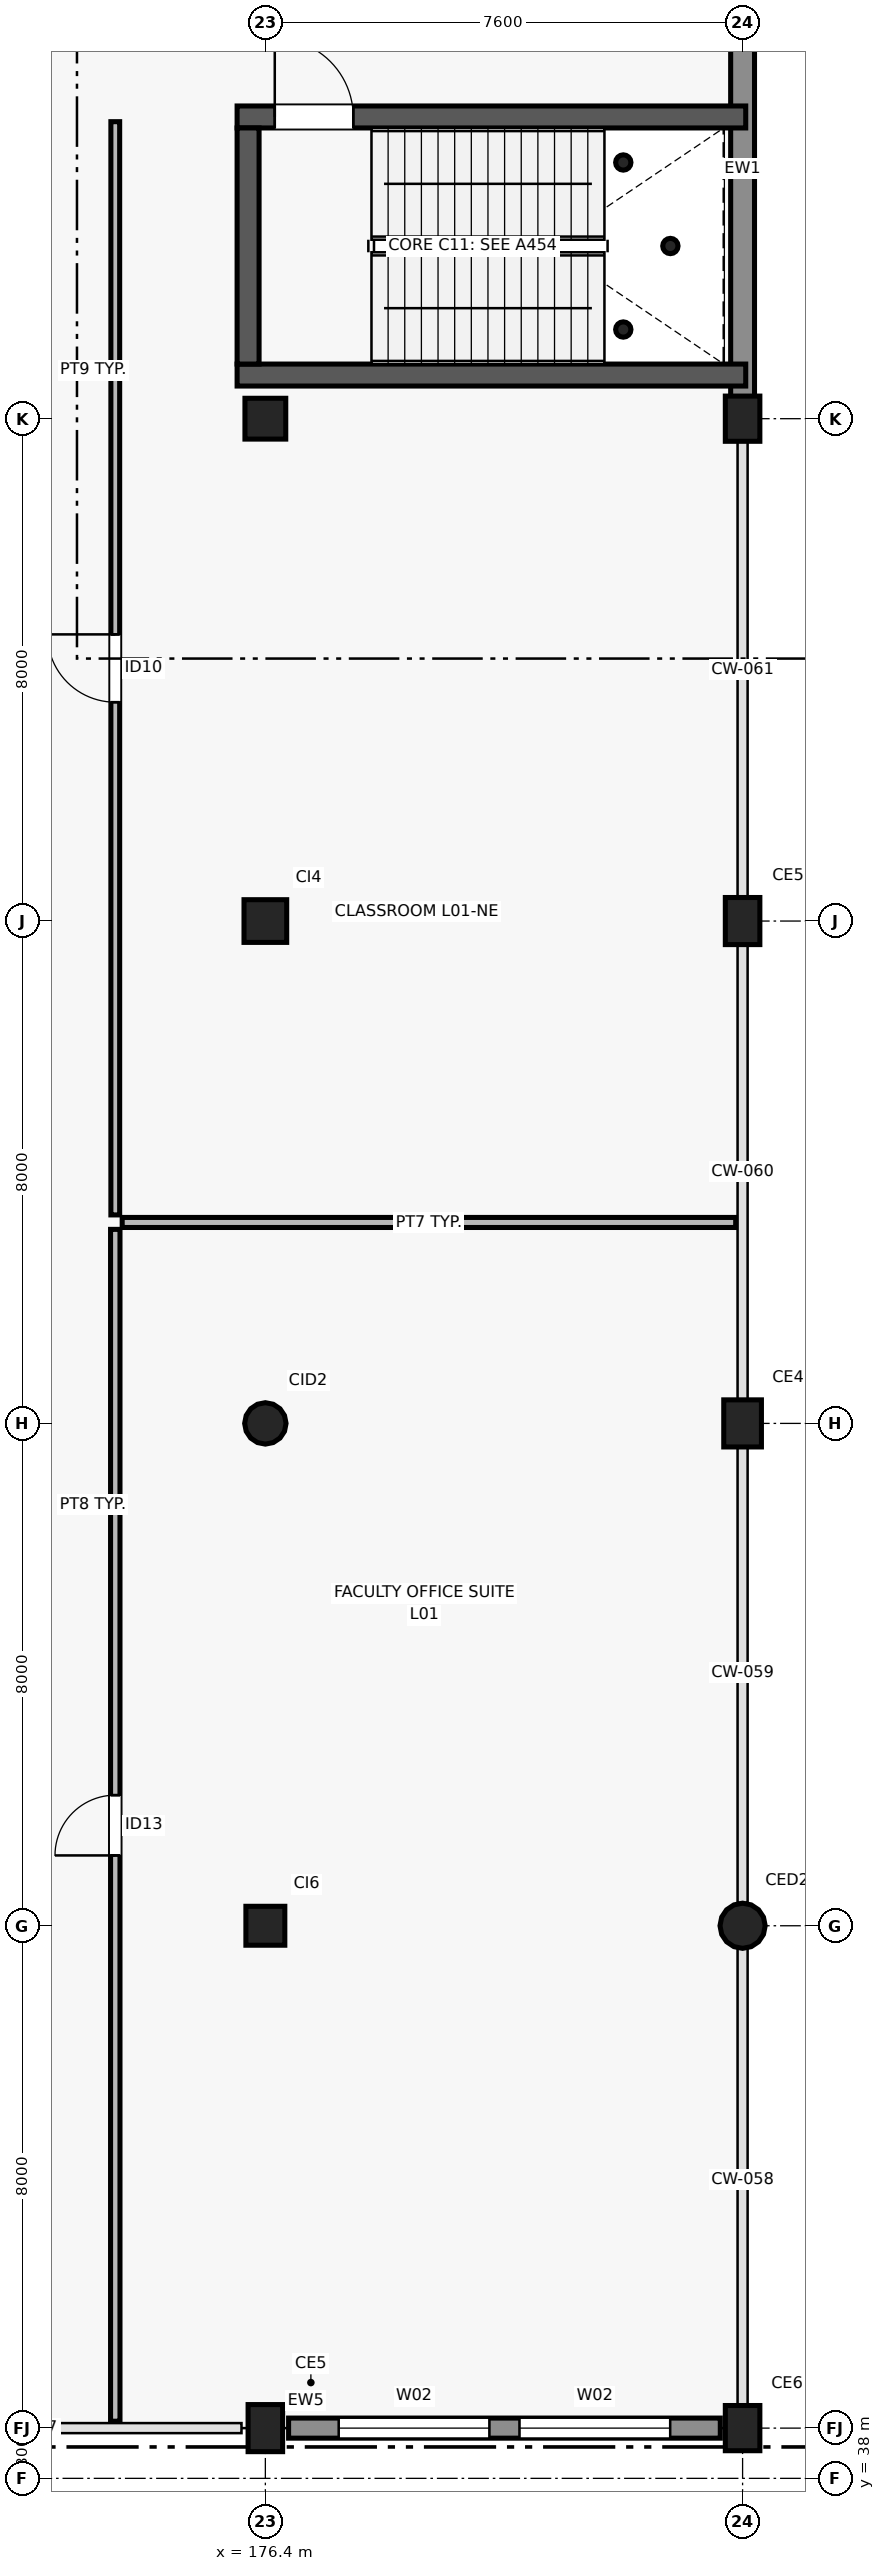
"""IFC4 building model, lengths in metres.
Left out: names, types, materials, properties, quantities, classifications, styles, units other than length and angle.
Written with IfcOpenShell. Run it as: python <this file> out.ifc"""

import sys

from ifc_helpers import new_model, si_unit, direction, frame, frame_2d, origin, origin_2d, place, context, subcontext, project, spatial, rectangle, circle, hollow_circle, extrude, element, fill, save


model = new_model("IFC4")
c1 = context("Model", 3, precision=1e-05, world=origin(), true_north=direction((0.0, 1.0)))
c2 = subcontext(c1, "Body", "Model", "MODEL_VIEW")
j1 = project(units=[si_unit("LENGTHUNIT", "METRE"), si_unit("PLANEANGLEUNIT", "RADIAN")], contexts=[c1])
p1 = place(None, origin())
s1 = spatial("IfcSite", under=j1, at=p1, CompositionType="ELEMENT")
p2 = place(p1, origin())
s2 = spatial("IfcBuilding", under=s1, at=p2, CompositionType="ELEMENT")
p3 = place(p2, frame((0.0, 0.0, 4.5)))
s3 = spatial("IfcBuildingStorey", under=s2, at=p3, CompositionType="ELEMENT", Elevation=4.5)
p4 = place(p3, frame((176.4, 38.8, 0.0), z_axis=(0.0, 0.0, 1.0), x_axis=(1.0, 0.0, 0.0)))
e1 = element("IfcColumn", 1, at=p4, inside=s3, PredefinedType="COLUMN", context=c2, shape_type="SweptSolid", body=[
    extrude(rectangle(XDim=0.75, YDim=0.55, at=origin_2d()), origin(), (0.0, 0.0, 1.0), 4.5),
])
p5 = place(p3, frame((176.4, 46.8, 0.0), z_axis=(0.0, 0.0, 1.0), x_axis=(1.0, 0.0, 0.0)))
e2 = element("IfcColumn", 2, at=p5, inside=s3, PredefinedType="COLUMN", context=c2, shape_type="SweptSolid", body=[
    extrude(rectangle(XDim=0.62, YDim=0.62, at=origin_2d()), origin(), (0.0, 0.0, 1.0), 4.5),
])
p6 = place(p3, frame((176.4, 54.8, 0.0), z_axis=(0.0, 0.0, 1.0), x_axis=(1.0, 0.0, 0.0)))
e3 = element("IfcColumn", 3, at=p6, inside=s3, PredefinedType="COLUMN", context=c2, shape_type="SweptSolid", body=[
    extrude(circle(Radius=0.33, at=origin_2d()), origin(), (0.0, 0.0, 1.0), 4.5),
])
p7 = place(p3, frame((176.4, 62.8, 0.0), z_axis=(0.0, 0.0, 1.0), x_axis=(1.0, 0.0, 0.0)))
e4 = element("IfcColumn", 4, at=p7, inside=s3, PredefinedType="COLUMN", context=c2, shape_type="SweptSolid", body=[
    extrude(rectangle(XDim=0.68, YDim=0.68, at=origin_2d()), origin(), (0.0, 0.0, 1.0), 4.5),
])
p8 = place(p3, frame((176.4, 70.8, 0.0), z_axis=(0.0, 0.0, 1.0), x_axis=(1.0, 0.0, 0.0)))
e5 = element("IfcColumn", 5, at=p8, inside=s3, PredefinedType="COLUMN", context=c2, shape_type="SweptSolid", body=[
    extrude(rectangle(XDim=0.65, YDim=0.65, at=origin_2d()), origin(), (0.0, 0.0, 1.0), 4.5),
])
p9 = place(p3, frame((184.0, 38.8, 0.0), z_axis=(0.0, 0.0, 1.0), x_axis=(1.0, 0.0, 0.0)))
e6 = element("IfcColumn", 6, at=p9, inside=s3, PredefinedType="COLUMN", context=c2, shape_type="SweptSolid", body=[
    extrude(rectangle(XDim=0.72, YDim=0.55, at=origin_2d()), origin(), (0.0, 0.0, 1.0), 4.5),
])
p10 = place(p3, frame((184.0, 46.8, 0.0), z_axis=(0.0, 0.0, 1.0), x_axis=(1.0, 0.0, 0.0)))
e7 = element("IfcColumn", 7, at=p10, inside=s3, PredefinedType="COLUMN", context=c2, shape_type="SweptSolid", body=[
    extrude(circle(Radius=0.36, at=origin_2d()), origin(), (0.0, 0.0, 1.0), 4.5),
])
p11 = place(p3, frame((184.0, 54.8, 0.0), z_axis=(0.0, 0.0, 1.0), x_axis=(1.0, 0.0, 0.0)))
e8 = element("IfcColumn", 8, at=p11, inside=s3, PredefinedType="COLUMN", context=c2, shape_type="SweptSolid", body=[
    extrude(rectangle(XDim=0.75, YDim=0.6, at=origin_2d()), origin(), (0.0, 0.0, 1.0), 4.5),
])
p12 = place(p3, frame((184.0, 62.8, 0.0), z_axis=(0.0, 0.0, 1.0), x_axis=(1.0, 0.0, 0.0)))
e9 = element("IfcColumn", 9, at=p12, inside=s3, PredefinedType="COLUMN", context=c2, shape_type="SweptSolid", body=[
    extrude(rectangle(XDim=0.75, YDim=0.55, at=origin_2d()), origin(), (0.0, 0.0, 1.0), 4.5),
])
p13 = place(p3, frame((184.0, 70.8, 0.0), z_axis=(0.0, 0.0, 1.0), x_axis=(1.0, 0.0, 0.0)))
e10 = element("IfcColumn", 10, at=p13, inside=s3, PredefinedType="COLUMN", context=c2, shape_type="SweptSolid", body=[
    extrude(rectangle(XDim=0.72, YDim=0.55, at=origin_2d()), origin(), (0.0, 0.0, 1.0), 4.5),
])
p14 = place(p3, frame((176.77, 38.8, 0.0), z_axis=(0.0, 0.0, 1.0), x_axis=(1.0, 0.0, 0.0)))
e11 = element("IfcWall", 11, at=p14, inside=s3, PredefinedType="SOLIDWALL", context=c2, shape_type="SweptSolid", body=[
    extrude(rectangle(XDim=6.875, YDim=0.32, at=frame_2d((3.438, 0.0))), origin(), (0.0, 0.0, 1.0), 3.57),
])
p15 = place(p14, frame((0.798, 0.0, 0.9)))
e12 = element("IfcOpeningElement", 12, at=p15, cuts=e11, PredefinedType="OPENING", context=c2, shape_type="SweptSolid", body=[
    extrude(rectangle(XDim=2.4, YDim=1.8, at=frame_2d((1.2, 0.9))), frame((0.0, 0.17, 0.0), z_axis=(0.0, -1.0, 0.0), x_axis=(1.0, 0.0, 0.0)), (0.0, 0.0, 1.0), 0.34),
])
p16 = place(p14, frame((3.677, 0.0, 0.9)))
e13 = element("IfcOpeningElement", 13, at=p16, cuts=e11, PredefinedType="OPENING", context=c2, shape_type="SweptSolid", body=[
    extrude(rectangle(XDim=2.4, YDim=1.8, at=frame_2d((1.2, 0.9))), frame((0.0, 0.17, 0.0), z_axis=(0.0, -1.0, 0.0), x_axis=(1.0, 0.0, 0.0)), (0.0, 0.0, 1.0), 0.34),
])
p17 = place(p3, frame((184.0, 71.07, 0.0), z_axis=(0.0, 0.0, 1.0), x_axis=(0.0, 1.0, 0.0)))
e14 = element("IfcWall", 14, at=p17, inside=s3, PredefinedType="SOLIDWALL", context=c2, shape_type="SweptSolid", body=[
    extrude(rectangle(XDim=7.427, YDim=0.38, at=frame_2d((3.714, 0.0))), origin(), (0.0, 0.0, 1.0), 4.22),
])
for number, where, z_axis, x_axis in (
    (15, (182.1, 72.22, 0.0), (0.0, 0.0, 1.0), (1.0, 0.0, 0.0)),
    (16, (182.1, 74.88, 0.0), (0.0, 0.0, 1.0), (1.0, 0.0, 0.0)),
    (17, (182.85, 73.55, 0.0), (0.0, 0.0, 1.0), (1.0, 0.0, 0.0)),
):
    element("IfcColumn", number, at=place(p3, frame(where, z_axis=z_axis, x_axis=x_axis)), inside=s3, PredefinedType="COLUMN", context=c2, shape_type="SweptSolid", body=[
        extrude(hollow_circle(Radius=0.122, WallThickness=0.01, at=origin_2d()), origin(), (0.0, 0.0, 1.0), 4.5),
    ])
p18 = place(p3, frame((175.95, 71.495, 0.0), z_axis=(0.0, 0.0, 1.0), x_axis=(1.0, 0.0, 0.0)))
e18 = element("IfcWall", 18, at=p18, inside=s3, PredefinedType="SHEAR", context=c2, shape_type="SweptSolid", body=[
    extrude(rectangle(XDim=8.1, YDim=0.35, at=frame_2d((4.05, 0.0))), origin(), (0.0, 0.0, 1.0), 4.22),
])
p19 = place(p3, frame((175.95, 75.605, 0.0), z_axis=(0.0, 0.0, 1.0), x_axis=(1.0, 0.0, 0.0)))
e19 = element("IfcWall", 19, at=p19, inside=s3, PredefinedType="SHEAR", context=c2, shape_type="SweptSolid", body=[
    extrude(rectangle(XDim=8.1, YDim=0.35, at=frame_2d((4.05, 0.0))), origin(), (0.0, 0.0, 1.0), 4.22),
])
p20 = place(p19, frame((0.6, 0.0, 0.0)))
e20 = element("IfcOpeningElement", 20, at=p20, cuts=e19, PredefinedType="OPENING", context=c2, shape_type="SweptSolid", body=[
    extrude(rectangle(XDim=1.25, YDim=2.2, at=frame_2d((0.625, 1.1))), frame((0.0, 0.185, 0.0), z_axis=(0.0, -1.0, 0.0), x_axis=(1.0, 0.0, 0.0)), (0.0, 0.0, 1.0), 0.37),
])
p21 = place(p3, frame((176.125, 71.67, 0.0), z_axis=(0.0, 0.0, 1.0), x_axis=(0.0, 1.0, 0.0)))
e21 = element("IfcWall", 21, at=p21, inside=s3, PredefinedType="SHEAR", context=c2, shape_type="SweptSolid", body=[
    extrude(rectangle(XDim=3.76, YDim=0.35, at=frame_2d((1.88, 0.0))), origin(), (0.0, 0.0, 1.0), 4.22),
])
p22 = place(p3, frame((174.12, 58.0, 0.0), z_axis=(0.0, 0.0, 1.0), x_axis=(1.0, 0.0, 0.0)))
e22 = element("IfcWall", 22, at=p22, inside=s3, PredefinedType="PARTITIONING", context=c2, shape_type="SweptSolid", body=[
    extrude(rectangle(XDim=9.77, YDim=0.16, at=frame_2d((4.885, 0.0))), origin(), (0.0, 0.0, 1.0), 4.2),
])
p23 = place(p3, frame((174.01, 38.91, 0.0), z_axis=(0.0, 0.0, 1.0), x_axis=(0.0, 1.0, 0.0)))
e23 = element("IfcWall", 23, at=p23, inside=s3, PredefinedType="PARTITIONING", context=c2, shape_type="SweptSolid", body=[
    extrude(rectangle(XDim=18.98, YDim=0.15, at=frame_2d((9.49, 0.0))), origin(), (0.0, 0.0, 1.0), 4.2),
])
p24 = place(p23, frame((9.01, 0.0, 0.0)))
e24 = element("IfcOpeningElement", 24, at=p24, cuts=e23, PredefinedType="OPENING", context=c2, shape_type="SweptSolid", body=[
    extrude(rectangle(XDim=0.96, YDim=2.15, at=frame_2d((0.48, 1.075))), frame((0.0, 0.085, 0.0), z_axis=(0.0, -1.0, 0.0), x_axis=(1.0, 0.0, 0.0)), (0.0, 0.0, 1.0), 0.17),
])
p25 = place(p3, frame((174.01, 58.12, 0.0), z_axis=(0.0, 0.0, 1.0), x_axis=(0.0, 1.0, 0.0)))
e25 = element("IfcWall", 25, at=p25, inside=s3, PredefinedType="PARTITIONING", context=c2, shape_type="SweptSolid", body=[
    extrude(rectangle(XDim=17.41, YDim=0.14, at=frame_2d((8.705, 0.0))), origin(), (0.0, 0.0, 1.0), 4.2),
])
p26 = place(p25, frame((8.165, 0.0, 0.0)))
e26 = element("IfcOpeningElement", 26, at=p26, cuts=e25, PredefinedType="OPENING", context=c2, shape_type="SweptSolid", body=[
    extrude(rectangle(XDim=1.08, YDim=2.15, at=frame_2d((0.54, 1.075))), frame((0.0, 0.08, 0.0), z_axis=(0.0, -1.0, 0.0), x_axis=(1.0, 0.0, 0.0)), (0.0, 0.0, 1.0), 0.16),
])
p27 = place(p15, origin())
e27 = element("IfcWindow", 27, at=p27, inside=s3, PartitioningType="SINGLE_PANEL", PredefinedType="WINDOW", context=c2, shape_type="SweptSolid", body=[
    extrude(rectangle(XDim=2.4, YDim=1.8, at=frame_2d((1.2, 0.9))), frame((0.0, 0.03, 0.0), z_axis=(0.0, -1.0, 0.0), x_axis=(1.0, 0.0, 0.0)), (0.0, 0.0, 1.0), 0.06),
])
fill(e12, e27)
p28 = place(p16, origin())
e28 = element("IfcWindow", 28, at=p28, inside=s3, PartitioningType="SINGLE_PANEL", PredefinedType="WINDOW", context=c2, shape_type="SweptSolid", body=[
    extrude(rectangle(XDim=2.4, YDim=1.8, at=frame_2d((1.2, 0.9))), frame((0.0, 0.03, 0.0), z_axis=(0.0, -1.0, 0.0), x_axis=(1.0, 0.0, 0.0)), (0.0, 0.0, 1.0), 0.06),
])
fill(e13, e28)
p29 = place(p20, origin())
e29 = element("IfcDoor", 29, at=p29, inside=s3, OperationType="SINGLE_SWING_LEFT", PredefinedType="DOOR", context=c2, shape_type="SweptSolid", body=[
    extrude(rectangle(XDim=1.25, YDim=2.2, at=frame_2d((0.625, 1.1))), frame((0.0, 0.025, 0.0), z_axis=(0.0, -1.0, 0.0), x_axis=(1.0, 0.0, 0.0)), (0.0, 0.0, 1.0), 0.05),
])
fill(e20, e29)
p30 = place(p24, origin())
e30 = element("IfcDoor", 30, at=p30, inside=s3, OperationType="SINGLE_SWING_LEFT", PredefinedType="DOOR", context=c2, shape_type="SweptSolid", body=[
    extrude(rectangle(XDim=0.96, YDim=2.15, at=frame_2d((0.48, 1.075))), frame((0.0, 0.025, 0.0), z_axis=(0.0, -1.0, 0.0), x_axis=(1.0, 0.0, 0.0)), (0.0, 0.0, 1.0), 0.05),
])
fill(e24, e30)
p31 = place(p26, origin())
e31 = element("IfcDoor", 31, at=p31, inside=s3, OperationType="SINGLE_SWING_RIGHT", PredefinedType="DOOR", context=c2, shape_type="SweptSolid", body=[
    extrude(rectangle(XDim=1.08, YDim=2.15, at=frame_2d((0.54, 1.075))), frame((0.0, 0.025, 0.0), z_axis=(0.0, -1.0, 0.0), x_axis=(1.0, 0.0, 0.0)), (0.0, 0.0, 1.0), 0.05),
])
fill(e26, e31)
save(model, sys.argv[1])
